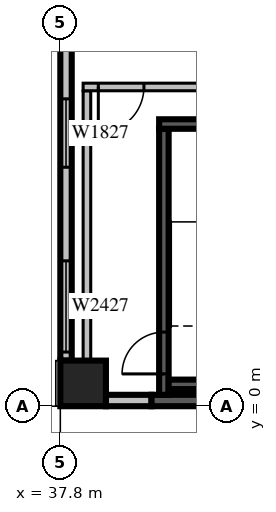
"""IFC4 building model, lengths in metres.
Left out: names, types, materials, properties, quantities, classifications, styles, units other than length and angle.
Written with IfcOpenShell. Run it as: python <this file> out.ifc"""

import sys

from ifc_helpers import new_model, si_unit, direction, frame, frame_2d, origin, origin_2d, place, context, subcontext, project, spatial, rectangle, extrude, source, transform, mapped, element, fill, save


model = new_model("IFC4")
c1 = context("Model", 3, precision=1e-05, world=origin(), true_north=direction((0.0, 1.0)))
c2 = subcontext(c1, "Body", "Model", "MODEL_VIEW")
j1 = project(units=[si_unit("LENGTHUNIT", "METRE"), si_unit("PLANEANGLEUNIT", "RADIAN")], contexts=[c1])
p1 = place(None, origin())
s1 = spatial("IfcSite", under=j1, at=p1, CompositionType="ELEMENT")
p2 = place(p1, origin())
s2 = spatial("IfcBuilding", under=s1, at=p2, CompositionType="ELEMENT")
p3 = place(p2, frame((0.0, 0.0, 57.3)))
s3 = spatial("IfcBuildingStorey", under=s2, at=p3, CompositionType="ELEMENT", Elevation=57.3)
m1 = source(origin(), c2, "Body", "SweptSolid", [
    extrude(rectangle(XDim=1.2, YDim=1.2, at=origin_2d()), origin(), (0.0, 0.0, 1.0), 4.2),
])
p4 = place(p3, frame((38.4, 0.6, 0.0), z_axis=(0.0, 0.0, 1.0), x_axis=(1.0, 0.0, 0.0)))
e1 = element("IfcColumn", 1, at=p4, inside=s3, PredefinedType="COLUMN", context=c2, shape_type="MappedRepresentation", body=[
    mapped(m1, transform((0.0, 0.0, 0.0), scale=1.0)),
])
m2 = source(origin(), c2, "Body", "SweptSolid", [
    extrude(rectangle(XDim=8.7, YDim=0.3, at=frame_2d((4.35, 0.0))), origin(), (0.0, 0.0, 1.0), 3.8),
])
p5 = place(p3, frame((37.95, 9.9, 0.0), z_axis=(0.0, 0.0, 1.0), x_axis=(0.0, -1.0, 0.0)))
e2 = element("IfcWall", 2, at=p5, inside=s3, PredefinedType="STANDARD", context=c2, shape_type="MappedRepresentation", body=[
    mapped(m2, transform((0.0, 0.0, 0.0), scale=1.0)),
])
m3 = source(origin(), c2, "Body", "SweptSolid", [
    extrude(rectangle(XDim=1.8, YDim=2.7, at=frame_2d((0.9, 1.35))), frame((0.0, 0.16, 0.0), z_axis=(0.0, -1.0, 0.0), x_axis=(1.0, 0.0, 0.0)), (0.0, 0.0, 1.0), 0.32),
])
p6 = place(p5, frame((1.812, 0.0, 0.6)))
e3 = element("IfcOpeningElement", 3, at=p6, cuts=e2, PredefinedType="OPENING", context=c2, shape_type="MappedRepresentation", body=[
    mapped(m3, transform((0.0, 0.0, 0.0), scale=1.0)),
])
m4 = source(origin(), c2, "Body", "SweptSolid", [
    extrude(rectangle(XDim=2.4, YDim=2.7, at=frame_2d((1.2, 1.35))), frame((0.0, 0.16, 0.0), z_axis=(0.0, -1.0, 0.0), x_axis=(1.0, 0.0, 0.0)), (0.0, 0.0, 1.0), 0.32),
])
p7 = place(p5, frame((6.075, 0.0, 0.6)))
e4 = element("IfcOpeningElement", 4, at=p7, cuts=e2, PredefinedType="OPENING", context=c2, shape_type="MappedRepresentation", body=[
    mapped(m4, transform((0.0, 0.0, 0.0), scale=1.0)),
])
m5 = source(origin(), c2, "Body", "SweptSolid", [
    extrude(rectangle(XDim=1.2, YDim=0.3, at=frame_2d((0.6, 0.0))), origin(), (0.0, 0.0, 1.0), 3.8),
])
p8 = place(p3, frame((39.0, 0.15, 0.0), z_axis=(0.0, 0.0, 1.0), x_axis=(1.0, 0.0, 0.0)))
e5 = element("IfcWall", 5, at=p8, inside=s3, PredefinedType="STANDARD", context=c2, shape_type="MappedRepresentation", body=[
    mapped(m5, transform((0.0, 0.0, 0.0), scale=1.0)),
])
m6 = source(origin(), c2, "Body", "SweptSolid", [
    extrude(rectangle(XDim=3.8, YDim=0.3, at=frame_2d((1.9, 0.0))), origin(), (0.0, 0.0, 1.0), 3.8),
])
p9 = place(p3, frame((40.2, 0.15, 0.0), z_axis=(0.0, 0.0, 1.0), x_axis=(1.0, 0.0, 0.0)))
e6 = element("IfcWall", 6, at=p9, inside=s3, PredefinedType="SOLIDWALL", context=c2, shape_type="MappedRepresentation", body=[
    mapped(m6, transform((0.0, 0.0, 0.0), scale=1.0)),
])
m7 = source(origin(), c2, "Body", "SweptSolid", [
    extrude(rectangle(XDim=7.0, YDim=0.25, at=frame_2d((3.5, 0.0))), origin(), (0.0, 0.0, 1.0), 3.8),
])
p10 = place(p3, frame((40.525, 0.3, 0.0), z_axis=(0.0, 0.0, 1.0), x_axis=(0.0, 1.0, 0.0)))
e7 = element("IfcWall", 7, at=p10, inside=s3, PredefinedType="SOLIDWALL", context=c2, shape_type="MappedRepresentation", body=[
    mapped(m7, transform((0.0, 0.0, 0.0), scale=1.0)),
])
m8 = source(origin(), c2, "Body", "SweptSolid", [
    extrude(rectangle(XDim=1.1, YDim=2.1, at=frame_2d((0.55, 1.05))), frame((0.0, 0.135, 0.0), z_axis=(0.0, -1.0, 0.0), x_axis=(1.0, 0.0, 0.0)), (0.0, 0.0, 1.0), 0.27),
])
p11 = place(p10, frame((0.55, 0.0, 0.0)))
e8 = element("IfcOpeningElement", 8, at=p11, cuts=e7, PredefinedType="OPENING", context=c2, shape_type="MappedRepresentation", body=[
    mapped(m8, transform((0.0, 0.0, 0.0), scale=1.0)),
])
m9 = source(origin(), c2, "Body", "SweptSolid", [
    extrude(rectangle(XDim=3.45, YDim=0.25, at=frame_2d((1.725, 0.0))), origin(), (0.0, 0.0, 1.0), 3.8),
])
p12 = place(p3, frame((40.4, 7.425, 0.0), z_axis=(0.0, 0.0, 1.0), x_axis=(1.0, 0.0, 0.0)))
e9 = element("IfcWall", 9, at=p12, inside=s3, PredefinedType="SOLIDWALL", context=c2, shape_type="MappedRepresentation", body=[
    mapped(m9, transform((0.0, 0.0, 0.0), scale=1.0)),
])
m10 = source(origin(), c2, "Body", "SweptSolid", [
    extrude(rectangle(XDim=2.95, YDim=0.25, at=frame_2d((1.475, 0.0))), origin(), (0.0, 0.0, 1.0), 3.8),
])
p13 = place(p3, frame((40.65, 0.575, 0.0), z_axis=(0.0, 0.0, 1.0), x_axis=(1.0, 0.0, 0.0)))
e10 = element("IfcWall", 10, at=p13, inside=s3, PredefinedType="SOLIDWALL", context=c2, shape_type="MappedRepresentation", body=[
    mapped(m10, transform((0.0, 0.0, 0.0), scale=1.0)),
])
m11 = source(origin(), c2, "Body", "SweptSolid", [
    extrude(rectangle(XDim=8.0, YDim=0.2, at=frame_2d((4.0, 0.0))), origin(), (0.0, 0.0, 1.0), 3.8),
])
p14 = place(p3, frame((38.5, 0.3, 0.0), z_axis=(0.0, 0.0, 1.0), x_axis=(0.0, 1.0, 0.0)))
e11 = element("IfcWall", 11, at=p14, inside=s3, PredefinedType="PARTITIONING", context=c2, shape_type="MappedRepresentation", body=[
    mapped(m11, transform((0.0, 0.0, 0.0), scale=1.0)),
])
m12 = source(origin(), c2, "Body", "SweptSolid", [
    extrude(rectangle(XDim=5.45, YDim=0.2, at=frame_2d((2.725, 0.0))), origin(), (0.0, 0.0, 1.0), 3.8),
])
p15 = place(p3, frame((38.4, 8.4, 0.0), z_axis=(0.0, 0.0, 1.0), x_axis=(1.0, 0.0, 0.0)))
e12 = element("IfcWall", 12, at=p15, inside=s3, PredefinedType="PARTITIONING", context=c2, shape_type="MappedRepresentation", body=[
    mapped(m12, transform((0.0, 0.0, 0.0), scale=1.0)),
])
m13 = source(origin(), c2, "Body", "SweptSolid", [
    extrude(rectangle(XDim=1.2, YDim=2.1, at=frame_2d((0.6, 1.05))), frame((0.0, 0.11, 0.0), z_axis=(0.0, -1.0, 0.0), x_axis=(1.0, 0.0, 0.0)), (0.0, 0.0, 1.0), 0.22),
])
p16 = place(p15, frame((0.4, 0.0, 0.0)))
e13 = element("IfcOpeningElement", 13, at=p16, cuts=e12, PredefinedType="OPENING", context=c2, shape_type="MappedRepresentation", body=[
    mapped(m13, transform((0.0, 0.0, 0.0), scale=1.0)),
])
m14 = source(origin(), c2, "Body", "SweptSolid", [
    extrude(rectangle(XDim=0.9, YDim=2.1, at=frame_2d((0.45, 1.05))), frame((0.0, 0.11, 0.0), z_axis=(0.0, -1.0, 0.0), x_axis=(1.0, 0.0, 0.0)), (0.0, 0.0, 1.0), 0.22),
])
p17 = place(p15, frame((3.25, 0.0, 0.0)))
e14 = element("IfcOpeningElement", 14, at=p17, cuts=e12, PredefinedType="OPENING", context=c2, shape_type="MappedRepresentation", body=[
    mapped(m14, transform((0.0, 0.0, 0.0), scale=1.0)),
])
m15 = source(origin(), c2, "Body", "SweptSolid", [
    extrude(rectangle(XDim=1.8, YDim=2.7, at=frame_2d((0.9, 1.35))), frame((0.0, 0.03, 0.0), z_axis=(0.0, -1.0, 0.0), x_axis=(1.0, 0.0, 0.0)), (0.0, 0.0, 1.0), 0.06),
])
p18 = place(p6, origin())
e15 = element("IfcWindow", 15, at=p18, inside=s3, PartitioningType="SINGLE_PANEL", PredefinedType="WINDOW", context=c2, shape_type="MappedRepresentation", body=[
    mapped(m15, transform((0.0, 0.0, 0.0), scale=1.0)),
])
fill(e3, e15)
m16 = source(origin(), c2, "Body", "SweptSolid", [
    extrude(rectangle(XDim=2.4, YDim=2.7, at=frame_2d((1.2, 1.35))), frame((0.0, 0.03, 0.0), z_axis=(0.0, -1.0, 0.0), x_axis=(1.0, 0.0, 0.0)), (0.0, 0.0, 1.0), 0.06),
])
p19 = place(p7, origin())
e16 = element("IfcWindow", 16, at=p19, inside=s3, PartitioningType="SINGLE_PANEL", PredefinedType="WINDOW", context=c2, shape_type="MappedRepresentation", body=[
    mapped(m16, transform((0.0, 0.0, 0.0), scale=1.0)),
])
fill(e4, e16)
m17 = source(origin(), c2, "Body", "SweptSolid", [
    extrude(rectangle(XDim=1.1, YDim=2.1, at=frame_2d((0.55, 1.05))), frame((0.0, 0.025, 0.0), z_axis=(0.0, -1.0, 0.0), x_axis=(1.0, 0.0, 0.0)), (0.0, 0.0, 1.0), 0.05),
])
p20 = place(p11, origin())
e17 = element("IfcDoor", 17, at=p20, inside=s3, OperationType="SINGLE_SWING_LEFT", PredefinedType="DOOR", context=c2, shape_type="MappedRepresentation", body=[
    mapped(m17, transform((0.0, 0.0, 0.0), scale=1.0)),
])
fill(e8, e17)
m18 = source(origin(), c2, "Body", "SweptSolid", [
    extrude(rectangle(XDim=1.2, YDim=2.1, at=frame_2d((0.6, 1.05))), frame((0.0, 0.025, 0.0), z_axis=(0.0, -1.0, 0.0), x_axis=(1.0, 0.0, 0.0)), (0.0, 0.0, 1.0), 0.05),
])
p21 = place(p16, origin())
e18 = element("IfcDoor", 18, at=p21, inside=s3, OperationType="SINGLE_SWING_RIGHT", PredefinedType="DOOR", context=c2, shape_type="MappedRepresentation", body=[
    mapped(m18, transform((0.0, 0.0, 0.0), scale=1.0)),
])
fill(e13, e18)
save(model, sys.argv[1])
